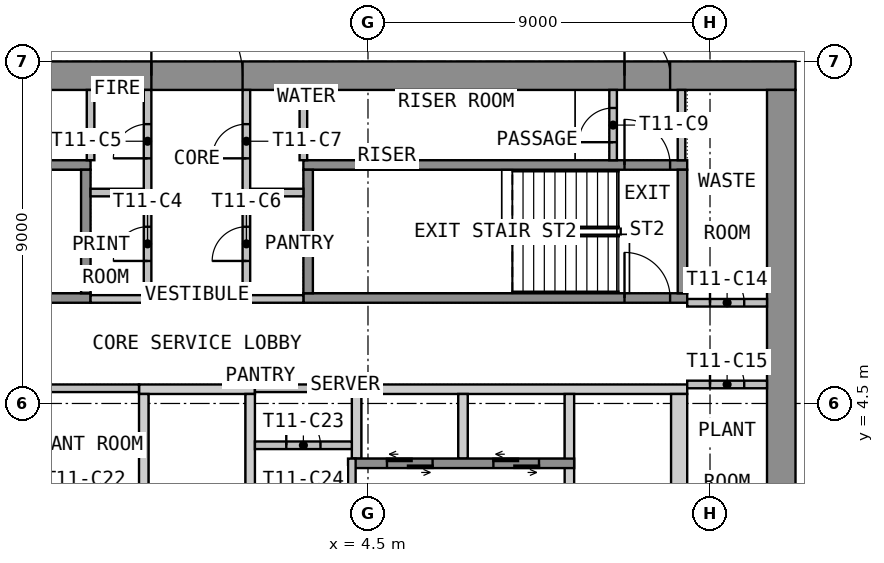
"""IFC4 building model, lengths in metres.
Left out: names, types, materials, properties, quantities, classifications, styles, units other than length and angle.
Written with IfcOpenShell. Run it as: python <this file> out.ifc"""

import sys

from ifc_helpers import new_model, si_unit, direction, frame, frame_2d, origin, place, context, subcontext, project, spatial, polyline, rectangle, outline, extrude, element, fill, save


model = new_model("IFC4")
c1 = context("Model", 3, precision=1e-05, world=origin(), true_north=direction((0.0, 1.0)))
c2 = subcontext(c1, "Body", "Model", "MODEL_VIEW")
j1 = project(units=[si_unit("LENGTHUNIT", "METRE"), si_unit("PLANEANGLEUNIT", "RADIAN")], contexts=[c1])
p1 = place(None, origin())
s1 = spatial("IfcSite", under=j1, at=p1, CompositionType="ELEMENT")
p2 = place(p1, origin())
s2 = spatial("IfcBuilding", under=s1, at=p2, CompositionType="ELEMENT")
p3 = place(p2, frame((0.0, 0.0, 156.0)))
s3 = spatial("IfcBuildingStorey", under=s2, at=p3, CompositionType="ELEMENT", Elevation=156.0)
p4 = place(p3, frame((-15.75, 13.125, 0.0), z_axis=(0.0, 0.0, 1.0), x_axis=(1.0, 0.0, 0.0)))
e1 = element("IfcWall", 1, at=p4, inside=s3, PredefinedType="SHEAR", context=c2, shape_type="SweptSolid", body=[
    extrude(rectangle(XDim=31.5, YDim=0.75, at=frame_2d((15.75, 0.0))), origin(), (0.0, 0.0, 1.0), 3.575),
])
p5 = place(p4, frame((14.55, 0.0, 0.0)))
e2 = element("IfcOpeningElement", 2, at=p5, cuts=e1, PredefinedType="OPENING", context=c2, shape_type="SweptSolid", body=[
    extrude(rectangle(XDim=2.4, YDim=2.1, at=frame_2d((1.2, 1.05))), frame((0.0, 0.385, 0.0), z_axis=(0.0, -1.0, 0.0), x_axis=(1.0, 0.0, 0.0)), (0.0, 0.0, 1.0), 0.77),
])
p6 = place(p4, frame((3.3, 0.0, 0.0)))
e3 = element("IfcOpeningElement", 3, at=p6, cuts=e1, PredefinedType="OPENING", context=c2, shape_type="SweptSolid", body=[
    extrude(rectangle(XDim=1.2, YDim=2.1, at=frame_2d((0.6, 1.05))), frame((0.0, 0.385, 0.0), z_axis=(0.0, -1.0, 0.0), x_axis=(1.0, 0.0, 0.0)), (0.0, 0.0, 1.0), 0.77),
])
p7 = place(p4, frame((27.0, 0.0, 0.0)))
e4 = element("IfcOpeningElement", 4, at=p7, cuts=e1, PredefinedType="OPENING", context=c2, shape_type="SweptSolid", body=[
    extrude(rectangle(XDim=1.2, YDim=2.1, at=frame_2d((0.6, 1.05))), frame((0.0, 0.385, 0.0), z_axis=(0.0, -1.0, 0.0), x_axis=(1.0, 0.0, 0.0)), (0.0, 0.0, 1.0), 0.77),
])
p8 = place(p3, frame((15.375, -12.75, 0.0), z_axis=(0.0, 0.0, 1.0), x_axis=(0.0, 1.0, 0.0)))
e5 = element("IfcWall", 5, at=p8, inside=s3, PredefinedType="SHEAR", context=c2, shape_type="SweptSolid", body=[
    extrude(rectangle(XDim=25.5, YDim=0.75, at=frame_2d((12.75, 0.0))), origin(), (0.0, 0.0, 1.0), 3.575),
])
p9 = place(p8, frame((11.55, 0.0, 0.0)))
e6 = element("IfcOpeningElement", 6, at=p9, cuts=e5, PredefinedType="OPENING", context=c2, shape_type="SweptSolid", body=[
    extrude(rectangle(XDim=2.4, YDim=2.1, at=frame_2d((1.2, 1.05))), frame((0.0, 0.385, 0.0), z_axis=(0.0, -1.0, 0.0), x_axis=(1.0, 0.0, 0.0)), (0.0, 0.0, 1.0), 0.77),
])
p10 = place(p3, origin())
e7 = element("IfcWall", 7, at=p10, inside=s3, PredefinedType="SHEAR", context=c2, shape_type="SweptSolid", body=[
    extrude(outline(polyline([(-1.525, 4.75), (1.525, 4.75), (1.525, 5.0), (-1.525, 5.0), (-1.525, 4.75)])), origin(), (0.0, 0.0, 1.0), 3.575),
])
p11 = place(p3, origin())
e8 = element("IfcWall", 8, at=p11, inside=s3, PredefinedType="SHEAR", context=c2, shape_type="SweptSolid", body=[
    extrude(outline(polyline([(4.075, 4.75), (12.9, 4.75), (12.9, 5.0), (4.075, 5.0), (4.075, 4.75)])), origin(), (0.0, 0.0, 1.0), 3.575),
])
p12 = place(p3, origin())
e9 = element("IfcWall", 9, at=p12, inside=s3, PredefinedType="SHEAR", context=c2, shape_type="SweptSolid", body=[
    extrude(outline(polyline([(-1.525, 2.05), (-1.275, 2.05), (-1.275, 4.75), (-1.525, 4.75), (-1.525, 2.05)])), origin(), (0.0, 0.0, 1.0), 3.575),
])
p13 = place(p3, origin())
e10 = element("IfcWall", 10, at=p13, inside=s3, PredefinedType="SHEAR", context=c2, shape_type="SweptSolid", body=[
    extrude(outline(polyline([(1.275, 2.05), (1.525, 2.05), (1.525, 4.75), (1.275, 4.75), (1.275, 2.05)])), origin(), (0.0, 0.0, 1.0), 3.575),
])
p14 = place(p3, origin())
e11 = element("IfcWall", 11, at=p14, inside=s3, PredefinedType="SHEAR", context=c2, shape_type="SweptSolid", body=[
    extrude(outline(polyline([(9.675, 2.05), (9.925, 2.05), (9.925, 4.75), (9.675, 4.75), (9.675, 2.05)])), origin(), (0.0, 0.0, 1.0), 3.575),
])
p15 = place(p3, origin())
e12 = element("IfcWall", 12, at=p15, inside=s3, PredefinedType="SHEAR", context=c2, shape_type="SweptSolid", body=[
    extrude(outline(polyline([(12.475, 2.05), (12.9, 2.05), (12.9, 4.75), (12.475, 4.75), (12.475, 2.05)])), origin(), (0.0, 0.0, 1.0), 3.575),
])
p16 = place(p3, origin())
e13 = element("IfcWall", 13, at=p16, inside=s3, PredefinedType="SHEAR", context=c2, shape_type="SweptSolid", body=[
    extrude(outline(polyline([(4.075, 3.05), (4.325, 3.05), (4.325, 4.75), (4.075, 4.75), (4.075, 3.05)])), origin(), (0.0, 0.0, 1.0), 3.575),
])
p17 = place(p3, origin())
e14 = element("IfcWall", 14, at=p17, inside=s3, PredefinedType="SHEAR", context=c2, shape_type="SweptSolid", body=[
    extrude(outline(polyline([(6.875, 3.05), (7.125, 3.05), (7.125, 4.75), (6.875, 4.75), (6.875, 3.05)])), origin(), (0.0, 0.0, 1.0), 3.575),
])
p18 = place(p3, frame((4.075, 2.925, 0.0), z_axis=(0.0, 0.0, 1.0), x_axis=(1.0, 0.0, 0.0)))
e15 = element("IfcWall", 15, at=p18, inside=s3, PredefinedType="SHEAR", context=c2, shape_type="SweptSolid", body=[
    extrude(rectangle(XDim=5.85, YDim=0.25, at=frame_2d((2.925, 0.0))), origin(), (0.0, 0.0, 1.0), 3.575),
])
p19 = place(p18, frame((0.925, 0.0, 0.0)))
e16 = element("IfcOpeningElement", 16, at=p19, cuts=e15, PredefinedType="OPENING", context=c2, shape_type="SweptSolid", body=[
    extrude(rectangle(XDim=1.2, YDim=2.1, at=frame_2d((0.6, 1.05))), frame((0.0, 0.135, 0.0), z_axis=(0.0, -1.0, 0.0), x_axis=(1.0, 0.0, 0.0)), (0.0, 0.0, 1.0), 0.27),
])
p20 = place(p18, frame((3.725, 0.0, 0.0)))
e17 = element("IfcOpeningElement", 17, at=p20, cuts=e15, PredefinedType="OPENING", context=c2, shape_type="SweptSolid", body=[
    extrude(rectangle(XDim=1.2, YDim=2.1, at=frame_2d((0.6, 1.05))), frame((0.0, 0.135, 0.0), z_axis=(0.0, -1.0, 0.0), x_axis=(1.0, 0.0, 0.0)), (0.0, 0.0, 1.0), 0.27),
])
p21 = place(p3, frame((-12.9, 7.275, 0.0), z_axis=(0.0, 0.0, 1.0), x_axis=(1.0, 0.0, 0.0)))
e18 = element("IfcWall", 18, at=p21, inside=s3, PredefinedType="SHEAR", context=c2, shape_type="SweptSolid", body=[
    extrude(rectangle(XDim=10.1, YDim=0.25, at=frame_2d((5.05, 0.0))), origin(), (0.0, 0.0, 1.0), 3.575),
])
p22 = place(p21, frame((0.45, 0.0, 0.0)))
e19 = element("IfcOpeningElement", 19, at=p22, cuts=e18, PredefinedType="OPENING", context=c2, shape_type="SweptSolid", body=[
    extrude(rectangle(XDim=1.2, YDim=2.1, at=frame_2d((0.6, 1.05))), frame((0.0, 0.135, 0.0), z_axis=(0.0, -1.0, 0.0), x_axis=(1.0, 0.0, 0.0)), (0.0, 0.0, 1.0), 0.27),
])
p23 = place(p3, frame((-12.9, 10.775, 0.0), z_axis=(0.0, 0.0, 1.0), x_axis=(1.0, 0.0, 0.0)))
e20 = element("IfcWall", 20, at=p23, inside=s3, PredefinedType="SHEAR", context=c2, shape_type="SweptSolid", body=[
    extrude(rectangle(XDim=10.1, YDim=0.25, at=frame_2d((5.05, 0.0))), origin(), (0.0, 0.0, 1.0), 3.575),
])
p24 = place(p23, frame((0.45, 0.0, 0.0)))
e21 = element("IfcOpeningElement", 21, at=p24, cuts=e20, PredefinedType="OPENING", context=c2, shape_type="SweptSolid", body=[
    extrude(rectangle(XDim=1.2, YDim=2.1, at=frame_2d((0.6, 1.05))), frame((0.0, 0.135, 0.0), z_axis=(0.0, -1.0, 0.0), x_axis=(1.0, 0.0, 0.0)), (0.0, 0.0, 1.0), 0.27),
])
p25 = place(p3, frame((-2.925, 7.4, 0.0), z_axis=(0.0, 0.0, 1.0), x_axis=(0.0, 1.0, 0.0)))
e22 = element("IfcWall", 22, at=p25, inside=s3, PredefinedType="SHEAR", context=c2, shape_type="SweptSolid", body=[
    extrude(rectangle(XDim=3.25, YDim=0.25, at=frame_2d((1.625, 0.0))), origin(), (0.0, 0.0, 1.0), 3.575),
])
p26 = place(p3, frame((2.8, 7.275, 0.0), z_axis=(0.0, 0.0, 1.0), x_axis=(1.0, 0.0, 0.0)))
e23 = element("IfcWall", 23, at=p26, inside=s3, PredefinedType="SHEAR", context=c2, shape_type="SweptSolid", body=[
    extrude(rectangle(XDim=10.1, YDim=0.25, at=frame_2d((5.05, 0.0))), origin(), (0.0, 0.0, 1.0), 3.575),
])
p27 = place(p26, frame((8.45, 0.0, 0.0)))
e24 = element("IfcOpeningElement", 24, at=p27, cuts=e23, PredefinedType="OPENING", context=c2, shape_type="SweptSolid", body=[
    extrude(rectangle(XDim=1.2, YDim=2.1, at=frame_2d((0.6, 1.05))), frame((0.0, 0.135, 0.0), z_axis=(0.0, -1.0, 0.0), x_axis=(1.0, 0.0, 0.0)), (0.0, 0.0, 1.0), 0.27),
])
p28 = place(p3, frame((2.8, 10.775, 0.0), z_axis=(0.0, 0.0, 1.0), x_axis=(1.0, 0.0, 0.0)))
e25 = element("IfcWall", 25, at=p28, inside=s3, PredefinedType="SHEAR", context=c2, shape_type="SweptSolid", body=[
    extrude(rectangle(XDim=10.1, YDim=0.25, at=frame_2d((5.05, 0.0))), origin(), (0.0, 0.0, 1.0), 3.575),
])
p29 = place(p28, frame((8.45, 0.0, 0.0)))
e26 = element("IfcOpeningElement", 26, at=p29, cuts=e25, PredefinedType="OPENING", context=c2, shape_type="SweptSolid", body=[
    extrude(rectangle(XDim=1.2, YDim=2.1, at=frame_2d((0.6, 1.05))), frame((0.0, 0.135, 0.0), z_axis=(0.0, -1.0, 0.0), x_axis=(1.0, 0.0, 0.0)), (0.0, 0.0, 1.0), 0.27),
])
for number, where, z_axis, x_axis in (
    (27, (2.925, 7.4, 0.0), (0.0, 0.0, 1.0), (0.0, 1.0, 0.0)),
    (28, (12.775, 7.4, 0.0), (0.0, 0.0, 1.0), (0.0, 1.0, 0.0)),
):
    element("IfcWall", number, at=place(p3, frame(where, z_axis=z_axis, x_axis=x_axis)), inside=s3, PredefinedType="SHEAR", context=c2, shape_type="SweptSolid", body=[
        extrude(rectangle(XDim=3.25, YDim=0.25, at=frame_2d((1.625, 0.0))), origin(), (0.0, 0.0, 1.0), 3.575),
    ])
for number, where, z_axis, x_axis in (
    (29, (-2.8, 7.25, 0.0), (0.0, 0.0, 1.0), (1.0, 0.0, 0.0)),
    (30, (-2.8, 10.05, 0.0), (0.0, 0.0, 1.0), (1.0, 0.0, 0.0)),
    (31, (1.4, 7.25, 0.0), (0.0, 0.0, 1.0), (1.0, 0.0, 0.0)),
    (32, (1.4, 10.05, 0.0), (0.0, 0.0, 1.0), (1.0, 0.0, 0.0)),
):
    element("IfcWall", number, at=place(p3, frame(where, z_axis=z_axis, x_axis=x_axis)), inside=s3, PredefinedType="PARTITIONING", context=c2, shape_type="SweptSolid", body=[
        extrude(rectangle(XDim=1.4, YDim=0.2, at=frame_2d((0.7, 0.0))), origin(), (0.0, 0.0, 1.0), 3.575),
    ])
p30 = place(p3, frame((-1.3, 7.15, 0.0), z_axis=(0.0, 0.0, 1.0), x_axis=(0.0, 1.0, 0.0)))
e33 = element("IfcWall", 33, at=p30, inside=s3, PredefinedType="PARTITIONING", context=c2, shape_type="SweptSolid", body=[
    extrude(rectangle(XDim=5.6, YDim=0.2, at=frame_2d((2.8, 0.0))), origin(), (0.0, 0.0, 1.0), 3.575),
])
p31 = place(p30, frame((1.1, 0.0, 0.0)))
e34 = element("IfcOpeningElement", 34, at=p31, cuts=e33, PredefinedType="OPENING", context=c2, shape_type="SweptSolid", body=[
    extrude(rectangle(XDim=0.9, YDim=2.1, at=frame_2d((0.45, 1.05))), frame((0.0, 0.11, 0.0), z_axis=(0.0, -1.0, 0.0), x_axis=(1.0, 0.0, 0.0)), (0.0, 0.0, 1.0), 0.22),
])
p32 = place(p30, frame((3.8, 0.0, 0.0)))
e35 = element("IfcOpeningElement", 35, at=p32, cuts=e33, PredefinedType="OPENING", context=c2, shape_type="SweptSolid", body=[
    extrude(rectangle(XDim=0.9, YDim=2.1, at=frame_2d((0.45, 1.05))), frame((0.0, 0.11, 0.0), z_axis=(0.0, -1.0, 0.0), x_axis=(1.0, 0.0, 0.0)), (0.0, 0.0, 1.0), 0.22),
])
p33 = place(p3, frame((1.3, 7.15, 0.0), z_axis=(0.0, 0.0, 1.0), x_axis=(0.0, 1.0, 0.0)))
e36 = element("IfcWall", 36, at=p33, inside=s3, PredefinedType="PARTITIONING", context=c2, shape_type="SweptSolid", body=[
    extrude(rectangle(XDim=5.6, YDim=0.2, at=frame_2d((2.8, 0.0))), origin(), (0.0, 0.0, 1.0), 3.575),
])
p34 = place(p33, frame((1.1, 0.0, 0.0)))
e37 = element("IfcOpeningElement", 37, at=p34, cuts=e36, PredefinedType="OPENING", context=c2, shape_type="SweptSolid", body=[
    extrude(rectangle(XDim=0.9, YDim=2.1, at=frame_2d((0.45, 1.05))), frame((0.0, 0.11, 0.0), z_axis=(0.0, -1.0, 0.0), x_axis=(1.0, 0.0, 0.0)), (0.0, 0.0, 1.0), 0.22),
])
p35 = place(p33, frame((3.8, 0.0, 0.0)))
e38 = element("IfcOpeningElement", 38, at=p35, cuts=e36, PredefinedType="OPENING", context=c2, shape_type="SweptSolid", body=[
    extrude(rectangle(XDim=0.9, YDim=2.1, at=frame_2d((0.45, 1.05))), frame((0.0, 0.11, 0.0), z_axis=(0.0, -1.0, 0.0), x_axis=(1.0, 0.0, 0.0)), (0.0, 0.0, 1.0), 0.22),
])
p36 = place(p3, frame((12.75, 10.9, 0.0), z_axis=(0.0, 0.0, 1.0), x_axis=(0.0, 1.0, 0.0)))
e39 = element("IfcWall", 39, at=p36, inside=s3, PredefinedType="PARTITIONING", context=c2, shape_type="SweptSolid", body=[
    extrude(rectangle(XDim=1.85, YDim=0.2, at=frame_2d((0.925, 0.0))), origin(), (0.0, 0.0, 1.0), 3.575),
])
p37 = place(p3, frame((10.95, 10.9, 0.0), z_axis=(0.0, 0.0, 1.0), x_axis=(0.0, 1.0, 0.0)))
e40 = element("IfcWall", 40, at=p37, inside=s3, PredefinedType="PARTITIONING", context=c2, shape_type="SweptSolid", body=[
    extrude(rectangle(XDim=1.85, YDim=0.2, at=frame_2d((0.925, 0.0))), origin(), (0.0, 0.0, 1.0), 3.575),
])
p38 = place(p37, frame((0.475, 0.0, 0.0)))
e41 = element("IfcOpeningElement", 41, at=p38, cuts=e40, PredefinedType="OPENING", context=c2, shape_type="SweptSolid", body=[
    extrude(rectangle(XDim=0.9, YDim=2.1, at=frame_2d((0.45, 1.05))), frame((0.0, 0.11, 0.0), z_axis=(0.0, -1.0, 0.0), x_axis=(1.0, 0.0, 0.0)), (0.0, 0.0, 1.0), 0.22),
])
p39 = place(p3, frame((12.9, 7.15, 0.0), z_axis=(0.0, 0.0, 1.0), x_axis=(1.0, 0.0, 0.0)))
e42 = element("IfcWall", 42, at=p39, inside=s3, PredefinedType="PARTITIONING", context=c2, shape_type="SweptSolid", body=[
    extrude(rectangle(XDim=2.1, YDim=0.2, at=frame_2d((1.05, 0.0))), origin(), (0.0, 0.0, 1.0), 3.575),
])
p40 = place(p39, frame((0.6, 0.0, 0.0)))
e43 = element("IfcOpeningElement", 43, at=p40, cuts=e42, PredefinedType="OPENING", context=c2, shape_type="SweptSolid", body=[
    extrude(rectangle(XDim=0.9, YDim=2.1, at=frame_2d((0.45, 1.05))), frame((0.0, 0.11, 0.0), z_axis=(0.0, -1.0, 0.0), x_axis=(1.0, 0.0, 0.0)), (0.0, 0.0, 1.0), 0.22),
])
p41 = place(p3, frame((12.9, 5.0, 0.0), z_axis=(0.0, 0.0, 1.0), x_axis=(1.0, 0.0, 0.0)))
e44 = element("IfcWall", 44, at=p41, inside=s3, PredefinedType="PARTITIONING", context=c2, shape_type="SweptSolid", body=[
    extrude(rectangle(XDim=2.1, YDim=0.2, at=frame_2d((1.05, 0.0))), origin(), (0.0, 0.0, 1.0), 3.575),
])
p42 = place(p41, frame((0.6, 0.0, 0.0)))
e45 = element("IfcOpeningElement", 45, at=p42, cuts=e44, PredefinedType="OPENING", context=c2, shape_type="SweptSolid", body=[
    extrude(rectangle(XDim=0.9, YDim=2.1, at=frame_2d((0.45, 1.05))), frame((0.0, 0.11, 0.0), z_axis=(0.0, -1.0, 0.0), x_axis=(1.0, 0.0, 0.0)), (0.0, 0.0, 1.0), 0.22),
])
p43 = place(p3, frame((-12.9, 4.9, 0.0), z_axis=(0.0, 0.0, 1.0), x_axis=(1.0, 0.0, 0.0)))
e46 = element("IfcWall", 46, at=p43, inside=s3, PredefinedType="PARTITIONING", context=c2, shape_type="SweptSolid", body=[
    extrude(rectangle(XDim=11.375, YDim=0.2, at=frame_2d((5.688, 0.0))), origin(), (0.0, 0.0, 1.0), 3.575),
])
p44 = place(p3, frame((1.525, 3.4, 0.0), z_axis=(0.0, 0.0, 1.0), x_axis=(1.0, 0.0, 0.0)))
e47 = element("IfcWall", 47, at=p44, inside=s3, PredefinedType="PARTITIONING", context=c2, shape_type="SweptSolid", body=[
    extrude(rectangle(XDim=2.55, YDim=0.2, at=frame_2d((1.275, 0.0))), origin(), (0.0, 0.0, 1.0), 3.575),
])
p45 = place(p44, frame((0.825, 0.0, 0.0)))
e48 = element("IfcOpeningElement", 48, at=p45, cuts=e47, PredefinedType="OPENING", context=c2, shape_type="SweptSolid", body=[
    extrude(rectangle(XDim=0.9, YDim=2.1, at=frame_2d((0.45, 1.05))), frame((0.0, 0.11, 0.0), z_axis=(0.0, -1.0, 0.0), x_axis=(1.0, 0.0, 0.0)), (0.0, 0.0, 1.0), 0.22),
])
p46 = place(p3, frame((1.525, 4.9, 0.0), z_axis=(0.0, 0.0, 1.0), x_axis=(1.0, 0.0, 0.0)))
e49 = element("IfcWall", 49, at=p46, inside=s3, PredefinedType="PARTITIONING", context=c2, shape_type="SweptSolid", body=[
    extrude(rectangle(XDim=2.55, YDim=0.2, at=frame_2d((1.275, 0.0))), origin(), (0.0, 0.0, 1.0), 3.575),
])
p47 = place(p3, frame((4.075, 1.9, 0.0), z_axis=(0.0, 0.0, 1.0), x_axis=(0.0, 1.0, 0.0)))
e50 = element("IfcWall", 50, at=p47, inside=s3, PredefinedType="PARTITIONING", context=c2, shape_type="SweptSolid", body=[
    extrude(rectangle(XDim=1.15, YDim=0.2, at=frame_2d((0.575, 0.0))), origin(), (0.0, 0.0, 1.0), 3.575),
])
for number, where, z_axis, x_axis in (
    (51, (-2.8, 10.901, 0.0), (0.0, 0.0, 1.0), (0.0, 1.0, 0.0)),
    (52, (2.8, 10.901, 0.0), (0.0, 0.0, 1.0), (0.0, 1.0, 0.0)),
):
    element("IfcWall", number, at=place(p3, frame(where, z_axis=z_axis, x_axis=x_axis)), inside=s3, PredefinedType="PARTITIONING", context=c2, shape_type="SweptSolid", body=[
        extrude(rectangle(XDim=1.848, YDim=0.2, at=frame_2d((0.924, 0.0))), origin(), (0.0, 0.0, 1.0), 3.575),
    ])
p48 = place(p5, origin())
e53 = element("IfcDoor", 53, at=p48, inside=s3, OperationType="DOUBLE_DOOR_DOUBLE_SWING", PredefinedType="DOOR", context=c2, shape_type="SweptSolid", body=[
    extrude(rectangle(XDim=2.4, YDim=2.1, at=frame_2d((1.2, 1.05))), frame((0.0, 0.025, 0.0), z_axis=(0.0, -1.0, 0.0), x_axis=(1.0, 0.0, 0.0)), (0.0, 0.0, 1.0), 0.05),
])
fill(e2, e53)
p49 = place(p7, origin())
e54 = element("IfcDoor", 54, at=p49, inside=s3, OperationType="SINGLE_SWING_RIGHT", PredefinedType="DOOR", context=c2, shape_type="SweptSolid", body=[
    extrude(rectangle(XDim=1.2, YDim=2.1, at=frame_2d((0.6, 1.05))), frame((0.0, 0.025, 0.0), z_axis=(0.0, -1.0, 0.0), x_axis=(1.0, 0.0, 0.0)), (0.0, 0.0, 1.0), 0.05),
])
fill(e4, e54)
p50 = place(p19, origin())
e55 = element("IfcDoor", 55, at=p50, inside=s3, OperationType="DOUBLE_DOOR_SLIDING", PredefinedType="DOOR", context=c2, shape_type="SweptSolid", body=[
    extrude(rectangle(XDim=1.2, YDim=2.1, at=frame_2d((0.6, 1.05))), frame((0.0, 0.025, 0.0), z_axis=(0.0, -1.0, 0.0), x_axis=(1.0, 0.0, 0.0)), (0.0, 0.0, 1.0), 0.05),
])
fill(e16, e55)
p51 = place(p20, origin())
e56 = element("IfcDoor", 56, at=p51, inside=s3, OperationType="DOUBLE_DOOR_SLIDING", PredefinedType="DOOR", context=c2, shape_type="SweptSolid", body=[
    extrude(rectangle(XDim=1.2, YDim=2.1, at=frame_2d((0.6, 1.05))), frame((0.0, 0.025, 0.0), z_axis=(0.0, -1.0, 0.0), x_axis=(1.0, 0.0, 0.0)), (0.0, 0.0, 1.0), 0.05),
])
fill(e17, e56)
p52 = place(p27, origin())
e57 = element("IfcDoor", 57, at=p52, inside=s3, OperationType="SINGLE_SWING_LEFT", PredefinedType="DOOR", context=c2, shape_type="SweptSolid", body=[
    extrude(rectangle(XDim=1.2, YDim=2.1, at=frame_2d((0.6, 1.05))), frame((0.0, 0.025, 0.0), z_axis=(0.0, -1.0, 0.0), x_axis=(1.0, 0.0, 0.0)), (0.0, 0.0, 1.0), 0.05),
])
fill(e24, e57)
p53 = place(p31, origin())
e58 = element("IfcDoor", 58, at=p53, inside=s3, OperationType="SINGLE_SWING_LEFT", PredefinedType="DOOR", context=c2, shape_type="SweptSolid", body=[
    extrude(rectangle(XDim=0.9, YDim=2.1, at=frame_2d((0.45, 1.05))), frame((0.0, 0.025, 0.0), z_axis=(0.0, -1.0, 0.0), x_axis=(1.0, 0.0, 0.0)), (0.0, 0.0, 1.0), 0.05),
])
fill(e34, e58)
p54 = place(p32, origin())
e59 = element("IfcDoor", 59, at=p54, inside=s3, OperationType="SINGLE_SWING_LEFT", PredefinedType="DOOR", context=c2, shape_type="SweptSolid", body=[
    extrude(rectangle(XDim=0.9, YDim=2.1, at=frame_2d((0.45, 1.05))), frame((0.0, 0.025, 0.0), z_axis=(0.0, -1.0, 0.0), x_axis=(1.0, 0.0, 0.0)), (0.0, 0.0, 1.0), 0.05),
])
fill(e35, e59)
p55 = place(p34, origin())
e60 = element("IfcDoor", 60, at=p55, inside=s3, OperationType="SINGLE_SWING_LEFT", PredefinedType="DOOR", context=c2, shape_type="SweptSolid", body=[
    extrude(rectangle(XDim=0.9, YDim=2.1, at=frame_2d((0.45, 1.05))), frame((0.0, 0.025, 0.0), z_axis=(0.0, -1.0, 0.0), x_axis=(1.0, 0.0, 0.0)), (0.0, 0.0, 1.0), 0.05),
])
fill(e37, e60)
p56 = place(p35, origin())
e61 = element("IfcDoor", 61, at=p56, inside=s3, OperationType="SINGLE_SWING_LEFT", PredefinedType="DOOR", context=c2, shape_type="SweptSolid", body=[
    extrude(rectangle(XDim=0.9, YDim=2.1, at=frame_2d((0.45, 1.05))), frame((0.0, 0.025, 0.0), z_axis=(0.0, -1.0, 0.0), x_axis=(1.0, 0.0, 0.0)), (0.0, 0.0, 1.0), 0.05),
])
fill(e38, e61)
p57 = place(p29, origin())
e62 = element("IfcDoor", 62, at=p57, inside=s3, OperationType="SINGLE_SWING_RIGHT", PredefinedType="DOOR", context=c2, shape_type="SweptSolid", body=[
    extrude(rectangle(XDim=1.2, YDim=2.1, at=frame_2d((0.6, 1.05))), frame((0.0, 0.025, 0.0), z_axis=(0.0, -1.0, 0.0), x_axis=(1.0, 0.0, 0.0)), (0.0, 0.0, 1.0), 0.05),
])
fill(e26, e62)
p58 = place(p38, origin())
e63 = element("IfcDoor", 63, at=p58, inside=s3, OperationType="SINGLE_SWING_LEFT", PredefinedType="DOOR", context=c2, shape_type="SweptSolid", body=[
    extrude(rectangle(XDim=0.9, YDim=2.1, at=frame_2d((0.45, 1.05))), frame((0.0, 0.025, 0.0), z_axis=(0.0, -1.0, 0.0), x_axis=(1.0, 0.0, 0.0)), (0.0, 0.0, 1.0), 0.05),
])
fill(e41, e63)
p59 = place(p40, origin())
e64 = element("IfcDoor", 64, at=p59, inside=s3, OperationType="SINGLE_SWING_LEFT", PredefinedType="DOOR", context=c2, shape_type="SweptSolid", body=[
    extrude(rectangle(XDim=0.9, YDim=2.1, at=frame_2d((0.45, 1.05))), frame((0.0, 0.025, 0.0), z_axis=(0.0, -1.0, 0.0), x_axis=(1.0, 0.0, 0.0)), (0.0, 0.0, 1.0), 0.05),
])
fill(e43, e64)
p60 = place(p42, origin())
e65 = element("IfcDoor", 65, at=p60, inside=s3, OperationType="SINGLE_SWING_LEFT", PredefinedType="DOOR", context=c2, shape_type="SweptSolid", body=[
    extrude(rectangle(XDim=0.9, YDim=2.1, at=frame_2d((0.45, 1.05))), frame((0.0, 0.025, 0.0), z_axis=(0.0, -1.0, 0.0), x_axis=(1.0, 0.0, 0.0)), (0.0, 0.0, 1.0), 0.05),
])
fill(e45, e65)
p61 = place(p45, origin())
e66 = element("IfcDoor", 66, at=p61, inside=s3, OperationType="SINGLE_SWING_LEFT", PredefinedType="DOOR", context=c2, shape_type="SweptSolid", body=[
    extrude(rectangle(XDim=0.9, YDim=2.1, at=frame_2d((0.45, 1.05))), frame((0.0, 0.025, 0.0), z_axis=(0.0, -1.0, 0.0), x_axis=(1.0, 0.0, 0.0)), (0.0, 0.0, 1.0), 0.05),
])
fill(e48, e66)
save(model, sys.argv[1])
